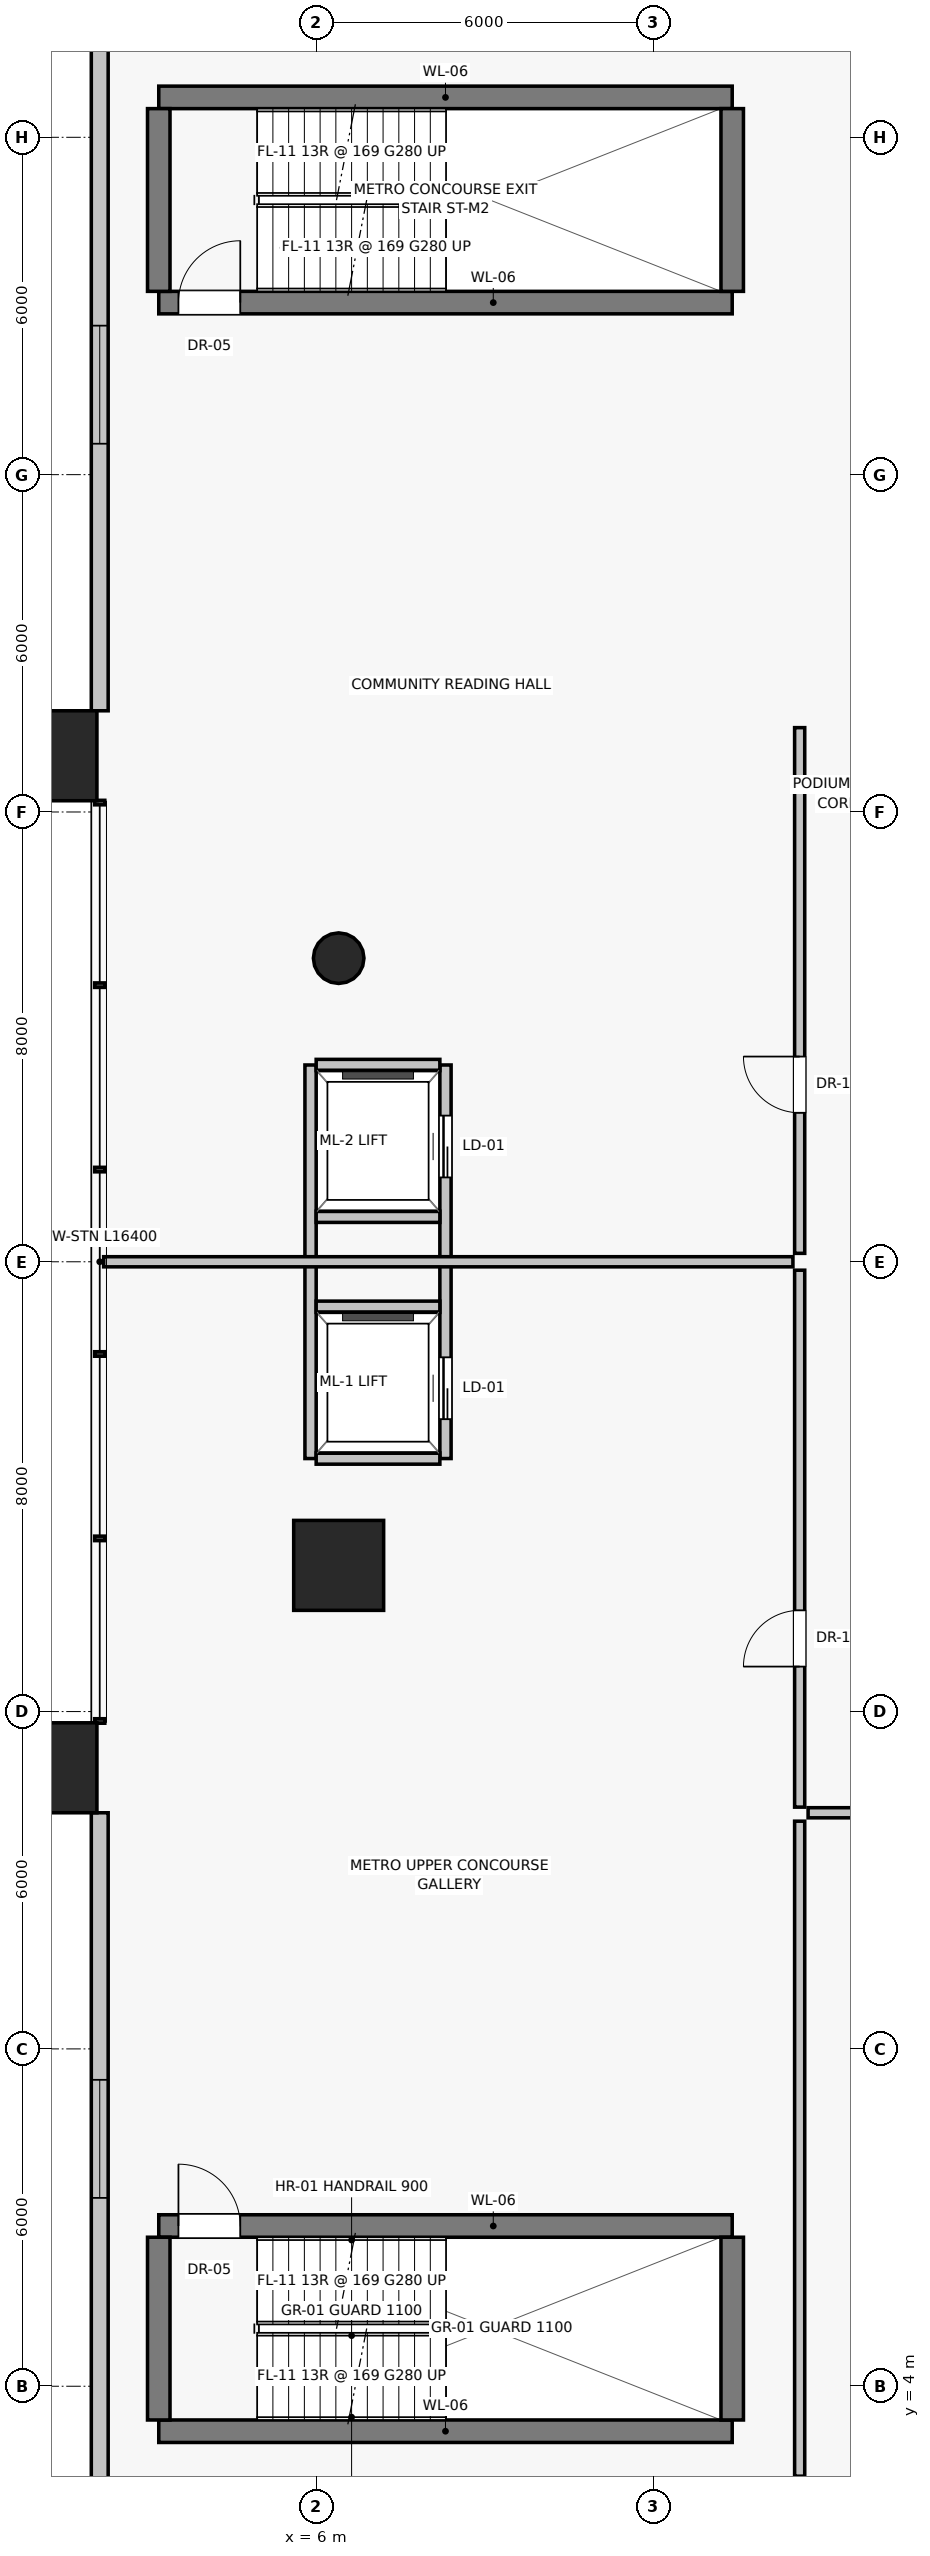
"""IFC4 building model, lengths in metres.
Left out: names, types, materials, properties, quantities, classifications, styles, units other than length and angle.
Written with IfcOpenShell. Run it as: python <this file> out.ifc"""

import sys

from ifc_helpers import new_model, si_unit, direction, frame, frame_2d, origin, origin_2d, place, context, subcontext, project, spatial, rectangle, circle, extrude, source, transform, mapped, element, fill, save


model = new_model("IFC4")
c1 = context("Model", 3, precision=1e-05, world=origin(), true_north=direction((0.0, 1.0)))
c2 = subcontext(c1, "Body", "Model", "MODEL_VIEW")
j1 = project(units=[si_unit("LENGTHUNIT", "METRE"), si_unit("PLANEANGLEUNIT", "RADIAN")], contexts=[c1])
p1 = place(None, origin())
s1 = spatial("IfcSite", under=j1, at=p1, CompositionType="ELEMENT")
p2 = place(p1, origin())
s2 = spatial("IfcBuilding", under=s1, at=p2, CompositionType="ELEMENT")
p3 = place(p2, frame((0.0, 0.0, 5.2)))
s3 = spatial("IfcBuildingStorey", under=s2, at=p3, CompositionType="ELEMENT", Elevation=5.2)
for number, where, z_axis, x_axis in (
    (1, (1.3, 15.0, 0.0), (0.0, 0.0, 1.0), (1.0, 0.0, 0.0)),
    (2, (1.3, 33.0, 0.0), (0.0, 0.0, 1.0), (1.0, 0.0, 0.0)),
):
    element("IfcColumn", number, at=place(p3, frame(where, z_axis=z_axis, x_axis=x_axis)), inside=s3, PredefinedType="COLUMN", context=c2, shape_type="SweptSolid", body=[
        extrude(rectangle(XDim=1.6, YDim=1.6, at=origin_2d()), origin(), (0.0, 0.0, 1.0), 4.4),
    ])
p4 = place(p3, frame((6.4, 29.4, 0.0), z_axis=(0.0, 0.0, 1.0), x_axis=(1.0, 0.0, 0.0)))
e3 = element("IfcColumn", 3, at=p4, inside=s3, PredefinedType="COLUMN", context=c2, shape_type="SweptSolid", body=[
    extrude(circle(Radius=0.45, at=origin_2d()), origin(), (0.0, 0.0, 1.0), 4.4),
])
p5 = place(p3, frame((6.4, 18.6, 0.0), z_axis=(0.0, 0.0, 1.0), x_axis=(1.0, 0.0, 0.0)))
e4 = element("IfcColumn", 4, at=p5, inside=s3, PredefinedType="COLUMN", context=c2, shape_type="SweptSolid", body=[
    extrude(rectangle(XDim=1.6, YDim=1.6, at=origin_2d()), origin(), (0.0, 0.0, 1.0), 4.4),
])
p6 = place(p3, frame((2.15, 45.7, 0.0), z_axis=(0.0, 0.0, 1.0), x_axis=(0.0, -1.0, 0.0)))
e5 = element("IfcWall", 5, at=p6, inside=s3, PredefinedType="SOLIDWALL", context=c2, shape_type="SweptSolid", body=[
    extrude(rectangle(XDim=11.9, YDim=0.3, at=frame_2d((5.95, 0.0))), origin(), (0.0, 0.0, 1.0), 3.0),
])
p7 = place(p6, frame((5.05, 0.0, 0.85)))
e6 = element("IfcOpeningElement", 6, at=p7, cuts=e5, PredefinedType="OPENING", context=c2, shape_type="SweptSolid", body=[
    extrude(rectangle(XDim=2.1, YDim=1.75, at=frame_2d((1.05, 0.875))), frame((0.0, 0.16, 0.0), z_axis=(0.0, -1.0, 0.0), x_axis=(1.0, 0.0, 0.0)), (0.0, 0.0, 1.0), 0.32),
])
p8 = place(p3, frame((2.15, 14.2, 0.0), z_axis=(0.0, 0.0, 1.0), x_axis=(0.0, -1.0, 0.0)))
e7 = element("IfcWall", 7, at=p8, inside=s3, PredefinedType="SOLIDWALL", context=c2, shape_type="SweptSolid", body=[
    extrude(rectangle(XDim=11.9, YDim=0.3, at=frame_2d((5.95, 0.0))), origin(), (0.0, 0.0, 1.0), 3.0),
])
p9 = place(p8, frame((4.75, 0.0, 0.85)))
e8 = element("IfcOpeningElement", 8, at=p9, cuts=e7, PredefinedType="OPENING", context=c2, shape_type="SweptSolid", body=[
    extrude(rectangle(XDim=2.1, YDim=1.75, at=frame_2d((1.05, 0.875))), frame((0.0, 0.16, 0.0), z_axis=(0.0, -1.0, 0.0), x_axis=(1.0, 0.0, 0.0)), (0.0, 0.0, 1.0), 0.32),
])
p10 = place(p3, frame((3.2, 3.2, 0.0), z_axis=(0.0, 0.0, 1.0), x_axis=(1.0, 0.0, 0.0)))
e9 = element("IfcWall", 9, at=p10, inside=s3, PredefinedType="SHEAR", context=c2, shape_type="SweptSolid", body=[
    extrude(rectangle(XDim=10.2, YDim=0.4, at=frame_2d((5.1, 0.0))), origin(), (0.0, 0.0, 1.0), 4.1),
])
p11 = place(p3, frame((3.2, 6.85, 0.0), z_axis=(0.0, 0.0, 1.0), x_axis=(1.0, 0.0, 0.0)))
e10 = element("IfcWall", 10, at=p11, inside=s3, PredefinedType="SHEAR", context=c2, shape_type="SweptSolid", body=[
    extrude(rectangle(XDim=10.2, YDim=0.4, at=frame_2d((5.1, 0.0))), origin(), (0.0, 0.0, 1.0), 4.1),
])
p12 = place(p11, frame((0.35, 0.0, 0.0)))
e11 = element("IfcOpeningElement", 11, at=p12, cuts=e10, PredefinedType="OPENING", context=c2, shape_type="SweptSolid", body=[
    extrude(rectangle(XDim=1.1, YDim=2.03, at=frame_2d((0.55, 1.015))), frame((0.0, 0.21, 0.0), z_axis=(0.0, -1.0, 0.0), x_axis=(1.0, 0.0, 0.0)), (0.0, 0.0, 1.0), 0.42),
])
for number, where, z_axis, x_axis in (
    (12, (3.2, 3.4, 0.0), (0.0, 0.0, 1.0), (0.0, 1.0, 0.0)),
    (13, (13.4, 3.4, 0.0), (0.0, 0.0, 1.0), (0.0, 1.0, 0.0)),
):
    element("IfcWall", number, at=place(p3, frame(where, z_axis=z_axis, x_axis=x_axis)), inside=s3, PredefinedType="SHEAR", context=c2, shape_type="SweptSolid", body=[
        extrude(rectangle(XDim=3.25, YDim=0.4, at=frame_2d((1.625, 0.0))), origin(), (0.0, 0.0, 1.0), 4.1),
    ])
p13 = place(p3, frame((3.2, 41.06, 0.0), z_axis=(0.0, 0.0, 1.0), x_axis=(1.0, 0.0, 0.0)))
e14 = element("IfcWall", 14, at=p13, inside=s3, PredefinedType="SHEAR", context=c2, shape_type="SweptSolid", body=[
    extrude(rectangle(XDim=10.2, YDim=0.4, at=frame_2d((5.1, 0.0))), origin(), (0.0, 0.0, 1.0), 4.1),
])
p14 = place(p13, frame((0.35, 0.0, 0.0)))
e15 = element("IfcOpeningElement", 15, at=p14, cuts=e14, PredefinedType="OPENING", context=c2, shape_type="SweptSolid", body=[
    extrude(rectangle(XDim=1.1, YDim=2.03, at=frame_2d((0.55, 1.015))), frame((0.0, 0.21, 0.0), z_axis=(0.0, -1.0, 0.0), x_axis=(1.0, 0.0, 0.0)), (0.0, 0.0, 1.0), 0.42),
])
p15 = place(p3, frame((3.2, 44.71, 0.0), z_axis=(0.0, 0.0, 1.0), x_axis=(1.0, 0.0, 0.0)))
e16 = element("IfcWall", 16, at=p15, inside=s3, PredefinedType="SHEAR", context=c2, shape_type="SweptSolid", body=[
    extrude(rectangle(XDim=10.2, YDim=0.4, at=frame_2d((5.1, 0.0))), origin(), (0.0, 0.0, 1.0), 4.1),
])
for number, where, z_axis, x_axis in (
    (17, (3.2, 41.26, 0.0), (0.0, 0.0, 1.0), (0.0, 1.0, 0.0)),
    (18, (13.4, 41.26, 0.0), (0.0, 0.0, 1.0), (0.0, 1.0, 0.0)),
):
    element("IfcWall", number, at=place(p3, frame(where, z_axis=z_axis, x_axis=x_axis)), inside=s3, PredefinedType="SHEAR", context=c2, shape_type="SweptSolid", body=[
        extrude(rectangle(XDim=3.25, YDim=0.4, at=frame_2d((1.625, 0.0))), origin(), (0.0, 0.0, 1.0), 4.1),
    ])
p16 = place(p3, frame((8.3, 20.5, 0.0), z_axis=(0.0, 0.0, 1.0), x_axis=(0.0, 1.0, 0.0)))
e19 = element("IfcWall", 19, at=p16, inside=s3, PredefinedType="SOLIDWALL", context=c2, shape_type="SweptSolid", body=[
    extrude(rectangle(XDim=7.0, YDim=0.2, at=frame_2d((3.5, 0.0))), origin(), (0.0, 0.0, 1.0), 4.1),
])
p17 = place(p16, frame((0.7, 0.0, 0.0)))
e20 = element("IfcOpeningElement", 20, at=p17, cuts=e19, PredefinedType="OPENING", context=c2, shape_type="SweptSolid", body=[
    extrude(rectangle(XDim=1.1, YDim=2.08, at=frame_2d((0.55, 1.04))), frame((0.0, 0.11, 0.0), z_axis=(0.0, -1.0, 0.0), x_axis=(1.0, 0.0, 0.0)), (0.0, 0.0, 1.0), 0.22),
])
p18 = place(p16, frame((5.0, 0.0, 0.0)))
e21 = element("IfcOpeningElement", 21, at=p18, cuts=e19, PredefinedType="OPENING", context=c2, shape_type="SweptSolid", body=[
    extrude(rectangle(XDim=1.1, YDim=2.08, at=frame_2d((0.55, 1.04))), frame((0.0, 0.11, 0.0), z_axis=(0.0, -1.0, 0.0), x_axis=(1.0, 0.0, 0.0)), (0.0, 0.0, 1.0), 0.22),
])
p19 = place(p3, frame((5.9, 20.5, 0.0), z_axis=(0.0, 0.0, 1.0), x_axis=(0.0, 1.0, 0.0)))
e22 = element("IfcWall", 22, at=p19, inside=s3, PredefinedType="SOLIDWALL", context=c2, shape_type="SweptSolid", body=[
    extrude(rectangle(XDim=7.0, YDim=0.2, at=frame_2d((3.5, 0.0))), origin(), (0.0, 0.0, 1.0), 3.232),
])
for number, where, z_axis, x_axis in (
    (23, (6.0, 20.5, 0.0), (0.0, 0.0, 1.0), (1.0, 0.0, 0.0)),
    (24, (6.0, 27.5, 0.0), (0.0, 0.0, 1.0), (1.0, 0.0, 0.0)),
    (25, (6.0, 23.2, 0.0), (0.0, 0.0, 1.0), (1.0, 0.0, 0.0)),
    (26, (6.0, 24.8, 0.0), (0.0, 0.0, 1.0), (1.0, 0.0, 0.0)),
):
    element("IfcWall", number, at=place(p3, frame(where, z_axis=z_axis, x_axis=x_axis)), inside=s3, PredefinedType="SOLIDWALL", context=c2, shape_type="SweptSolid", body=[
        extrude(rectangle(XDim=2.2, YDim=0.2, at=frame_2d((1.1, 0.0))), origin(), (0.0, 0.0, 1.0), 4.1),
    ])
p20 = place(p3, frame((14.6, 14.3, 0.0), z_axis=(0.0, 0.0, 1.0), x_axis=(0.0, 1.0, 0.0)))
e27 = element("IfcWall", 27, at=p20, inside=s3, PredefinedType="PARTITIONING", context=c2, shape_type="SweptSolid", body=[
    extrude(rectangle(XDim=9.55, YDim=0.18, at=frame_2d((4.775, 0.0))), origin(), (0.0, 0.0, 1.0), 4.1),
])
p21 = place(p20, frame((2.5, 0.0, 0.0)))
e28 = element("IfcOpeningElement", 28, at=p21, cuts=e27, PredefinedType="OPENING", context=c2, shape_type="SweptSolid", body=[
    extrude(rectangle(XDim=1.0, YDim=2.01, at=frame_2d((0.5, 1.005))), frame((0.0, 0.1, 0.0), z_axis=(0.0, -1.0, 0.0), x_axis=(1.0, 0.0, 0.0)), (0.0, 0.0, 1.0), 0.2),
])
p22 = place(p3, frame((14.6, 24.15, 0.0), z_axis=(0.0, 0.0, 1.0), x_axis=(0.0, 1.0, 0.0)))
e29 = element("IfcWall", 29, at=p22, inside=s3, PredefinedType="PARTITIONING", context=c2, shape_type="SweptSolid", body=[
    extrude(rectangle(XDim=9.35, YDim=0.18, at=frame_2d((4.675, 0.0))), origin(), (0.0, 0.0, 1.0), 4.1),
])
p23 = place(p22, frame((2.5, 0.0, 0.0)))
e30 = element("IfcOpeningElement", 30, at=p23, cuts=e29, PredefinedType="OPENING", context=c2, shape_type="SweptSolid", body=[
    extrude(rectangle(XDim=1.0, YDim=2.01, at=frame_2d((0.5, 1.005))), frame((0.0, 0.1, 0.0), z_axis=(0.0, -1.0, 0.0), x_axis=(1.0, 0.0, 0.0)), (0.0, 0.0, 1.0), 0.2),
])
p24 = place(p3, frame((2.22, 24.0, 0.0), z_axis=(0.0, 0.0, 1.0), x_axis=(1.0, 0.0, 0.0)))
e31 = element("IfcWall", 31, at=p24, inside=s3, PredefinedType="PARTITIONING", context=c2, shape_type="SweptSolid", body=[
    extrude(rectangle(XDim=12.26, YDim=0.18, at=frame_2d((6.13, 0.0))), origin(), (0.0, 0.0, 1.0), 4.1),
])
p25 = place(p3, frame((14.6, 2.4, 0.0), z_axis=(0.0, 0.0, 1.0), x_axis=(0.0, 1.0, 0.0)))
e32 = element("IfcWall", 32, at=p25, inside=s3, PredefinedType="PARTITIONING", context=c2, shape_type="SweptSolid", body=[
    extrude(rectangle(XDim=11.65, YDim=0.18, at=frame_2d((5.825, 0.0))), origin(), (0.0, 0.0, 1.0), 4.1),
])
p26 = place(p3, frame((14.75, 14.2, 0.0), z_axis=(0.0, 0.0, 1.0), x_axis=(1.0, 0.0, 0.0)))
e33 = element("IfcWall", 33, at=p26, inside=s3, PredefinedType="PARTITIONING", context=c2, shape_type="SweptSolid", body=[
    extrude(rectangle(XDim=10.1, YDim=0.18, at=frame_2d((5.05, 0.0))), origin(), (0.0, 0.0, 1.0), 4.1),
])
p27 = place(p26, frame((2.5, 0.0, 0.0)))
e34 = element("IfcOpeningElement", 34, at=p27, cuts=e33, PredefinedType="OPENING", context=c2, shape_type="SweptSolid", body=[
    extrude(rectangle(XDim=1.0, YDim=2.01, at=frame_2d((0.5, 1.005))), frame((0.0, 0.1, 0.0), z_axis=(0.0, -1.0, 0.0), x_axis=(1.0, 0.0, 0.0)), (0.0, 0.0, 1.0), 0.2),
])
m1 = source(origin(), c2, "Body", "SweptSolid", [
    extrude(rectangle(XDim=2.1, YDim=1.75, at=frame_2d((1.05, 0.875))), frame((0.0, 0.03, 0.0), z_axis=(0.0, -1.0, 0.0), x_axis=(1.0, 0.0, 0.0)), (0.0, 0.0, 1.0), 0.06),
])
p28 = place(p7, origin())
e35 = element("IfcWindow", 35, at=p28, inside=s3, PartitioningType="DOUBLE_PANEL_VERTICAL", PredefinedType="WINDOW", context=c2, shape_type="MappedRepresentation", body=[
    mapped(m1, transform((0.0, 0.0, 0.0), scale=1.0)),
])
fill(e6, e35)
p29 = place(p9, origin())
e36 = element("IfcWindow", 36, at=p29, inside=s3, PartitioningType="DOUBLE_PANEL_VERTICAL", PredefinedType="WINDOW", context=c2, shape_type="MappedRepresentation", body=[
    mapped(m1, transform((0.0, 0.0, 0.0), scale=1.0)),
])
fill(e8, e36)
m2 = source(origin(), c2, "Body", "SweptSolid", [
    extrude(rectangle(XDim=1.1, YDim=2.03, at=frame_2d((0.55, 1.015))), frame((0.0, 0.025, 0.0), z_axis=(0.0, -1.0, 0.0), x_axis=(1.0, 0.0, 0.0)), (0.0, 0.0, 1.0), 0.05),
])
p30 = place(p12, origin())
e37 = element("IfcDoor", 37, at=p30, inside=s3, OperationType="SINGLE_SWING_LEFT", PredefinedType="DOOR", context=c2, shape_type="MappedRepresentation", body=[
    mapped(m2, transform((0.0, 0.0, 0.0), scale=1.0)),
])
fill(e11, e37)
p31 = place(p14, origin())
e38 = element("IfcDoor", 38, at=p31, inside=s3, OperationType="SINGLE_SWING_RIGHT", PredefinedType="DOOR", context=c2, shape_type="MappedRepresentation", body=[
    mapped(m2, transform((0.0, 0.0, 0.0), scale=1.0)),
])
fill(e15, e38)
m3 = source(origin(), c2, "Body", "SweptSolid", [
    extrude(rectangle(XDim=1.1, YDim=2.08, at=frame_2d((0.55, 1.04))), frame((0.0, 0.025, 0.0), z_axis=(0.0, -1.0, 0.0), x_axis=(1.0, 0.0, 0.0)), (0.0, 0.0, 1.0), 0.05),
])
p32 = place(p17, origin())
e39 = element("IfcDoor", 39, at=p32, inside=s3, OperationType="SLIDING_TO_LEFT", PredefinedType="DOOR", context=c2, shape_type="MappedRepresentation", body=[
    mapped(m3, transform((0.0, 0.0, 0.0), scale=1.0)),
])
fill(e20, e39)
p33 = place(p18, origin())
e40 = element("IfcDoor", 40, at=p33, inside=s3, OperationType="SLIDING_TO_LEFT", PredefinedType="DOOR", context=c2, shape_type="MappedRepresentation", body=[
    mapped(m3, transform((0.0, 0.0, 0.0), scale=1.0)),
])
fill(e21, e40)
m4 = source(origin(), c2, "Body", "SweptSolid", [
    extrude(rectangle(XDim=1.0, YDim=2.01, at=frame_2d((0.5, 1.005))), frame((0.0, 0.025, 0.0), z_axis=(0.0, -1.0, 0.0), x_axis=(1.0, 0.0, 0.0)), (0.0, 0.0, 1.0), 0.05),
])
p34 = place(p21, origin())
e41 = element("IfcDoor", 41, at=p34, inside=s3, OperationType="SINGLE_SWING_LEFT", PredefinedType="DOOR", context=c2, shape_type="MappedRepresentation", body=[
    mapped(m4, transform((0.0, 0.0, 0.0), scale=1.0)),
])
fill(e28, e41)
p35 = place(p23, origin())
e42 = element("IfcDoor", 42, at=p35, inside=s3, OperationType="SINGLE_SWING_RIGHT", PredefinedType="DOOR", context=c2, shape_type="MappedRepresentation", body=[
    mapped(m4, transform((0.0, 0.0, 0.0), scale=1.0)),
])
fill(e30, e42)
save(model, sys.argv[1])
